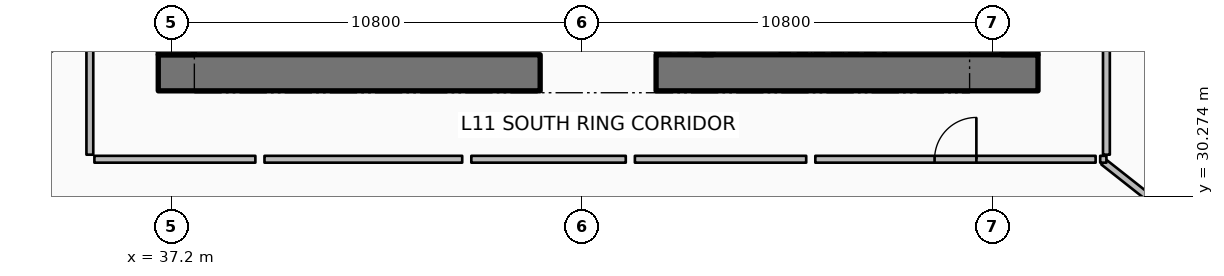
"""IFC4 building model, lengths in metres.
Left out: names, types, materials, properties, quantities, classifications, styles, units other than length and angle.
Written with IfcOpenShell. Run it as: python <this file> out.ifc"""

import sys

from ifc_helpers import new_model, si_unit, direction, frame, frame_2d, origin, place, context, subcontext, project, spatial, rectangle, extrude, element, fill, save


model = new_model("IFC4")
c1 = context("Model", 3, precision=1e-05, world=origin(), true_north=direction((0.0, 1.0)))
c2 = subcontext(c1, "Body", "Model", "MODEL_VIEW")
j1 = project(units=[si_unit("LENGTHUNIT", "METRE"), si_unit("PLANEANGLEUNIT", "RADIAN")], contexts=[c1])
p1 = place(None, origin())
s1 = spatial("IfcSite", under=j1, at=p1, CompositionType="ELEMENT")
p2 = place(p1, origin())
s2 = spatial("IfcBuilding", under=s1, at=p2, CompositionType="ELEMENT")
p3 = place(p2, frame((0.0, 0.0, 48.9)))
s3 = spatial("IfcBuildingStorey", under=s2, at=p3, CompositionType="ELEMENT", Elevation=48.9)
p4 = place(p3, frame((36.85, 33.525, 0.0), z_axis=(0.0, 0.0, 1.0), x_axis=(1.0, 0.0, 0.0)))
e1 = element("IfcWall", 1, at=p4, inside=s3, PredefinedType="SHEAR", context=c2, shape_type="SweptSolid", body=[
    extrude(rectangle(XDim=10.05, YDim=0.95, at=frame_2d((5.025, 0.0))), origin(), (0.0, 0.0, 1.0), 3.75),
])
p5 = place(p3, frame((49.95, 33.525, 0.0), z_axis=(0.0, 0.0, 1.0), x_axis=(1.0, 0.0, 0.0)))
e2 = element("IfcWall", 2, at=p5, inside=s3, PredefinedType="SHEAR", context=c2, shape_type="SweptSolid", body=[
    extrude(rectangle(XDim=10.05, YDim=0.95, at=frame_2d((5.025, 0.0))), origin(), (0.0, 0.0, 1.0), 3.75),
])
for number, where, z_axis, x_axis in (
    (3, (37.325, 34.0, 0.0), (0.0, 0.0, 1.0), (0.0, 1.0, 0.0)),
    (4, (59.525, 34.0, 0.0), (0.0, 0.0, 1.0), (0.0, 1.0, 0.0)),
):
    element("IfcWall", number, at=place(p3, frame(where, z_axis=z_axis, x_axis=x_axis)), inside=s3, PredefinedType="SHEAR", context=c2, shape_type="SweptSolid", body=[
        extrude(rectangle(XDim=16.0, YDim=0.95, at=frame_2d((8.0, 0.0))), origin(), (0.0, 0.0, 1.0), 3.75),
    ])
p6 = place(p3, frame((51.31, 34.0, 0.0), z_axis=(0.0, 0.0, 1.0), x_axis=(0.0, 1.0, 0.0)))
e5 = element("IfcWall", 5, at=p6, inside=s3, PredefinedType="SHEAR", context=c2, shape_type="SweptSolid", body=[
    extrude(rectangle(XDim=3.5, YDim=0.28, at=frame_2d((1.75, 0.0))), origin(), (0.0, 0.0, 1.0), 3.75),
])
p7 = place(p3, frame((34.954, 34.694, 0.0), z_axis=(0.0, 0.0, 1.0), x_axis=(-0.872493465611, -0.488625779577, 0.0)))
e6 = element("IfcWall", 6, at=p7, inside=s3, PredefinedType="PARTITIONING", context=c2, shape_type="SweptSolid", body=[
    extrude(rectangle(XDim=16.586, YDim=0.18, at=frame_2d((8.293, 0.0))), origin(), (0.0, 0.0, 1.0), 2.867),
])
p8 = place(p3, frame((61.723, 31.182, 0.0), z_axis=(0.0, 0.0, 1.0), x_axis=(0.785321288316, -0.619088421889, 0.0)))
e7 = element("IfcWall", 7, at=p8, inside=s3, PredefinedType="PARTITIONING", context=c2, shape_type="SweptSolid", body=[
    extrude(rectangle(XDim=10.598, YDim=0.18, at=frame_2d((5.299, 0.0))), origin(), (0.0, 0.0, 1.0), 2.867),
])
p9 = place(p3, frame((54.14, 31.25, 0.0), z_axis=(0.0, 0.0, 1.0), x_axis=(1.0, 0.0, 0.0)))
e8 = element("IfcWall", 8, at=p9, inside=s3, PredefinedType="PARTITIONING", context=c2, shape_type="SweptSolid", body=[
    extrude(rectangle(XDim=7.376, YDim=0.18, at=frame_2d((3.688, 0.0))), origin(), (0.0, 0.0, 1.0), 2.867),
])
p10 = place(p9, frame((3.138, 0.0, 0.0)))
e9 = element("IfcOpeningElement", 9, at=p10, cuts=e8, PredefinedType="OPENING", context=c2, shape_type="SweptSolid", body=[
    extrude(rectangle(XDim=1.1, YDim=2.1, at=frame_2d((0.55, 1.05))), frame((0.0, 0.1, 0.0), z_axis=(0.0, -1.0, 0.0), x_axis=(1.0, 0.0, 0.0)), (0.0, 0.0, 1.0), 0.2),
])
p11 = place(p3, frame((35.05, 34.628, 0.0), z_axis=(0.0, 0.0, 1.0), x_axis=(0.0, -1.0, 0.0)))
e10 = element("IfcWall", 10, at=p11, inside=s3, PredefinedType="PARTITIONING", context=c2, shape_type="SweptSolid", body=[
    extrude(rectangle(XDim=3.258, YDim=0.18, at=frame_2d((1.629, 0.0))), origin(), (0.0, 0.0, 1.0), 2.867),
])
p12 = place(p3, frame((35.17, 31.25, 0.0), z_axis=(0.0, 0.0, 1.0), x_axis=(1.0, 0.0, 0.0)))
e11 = element("IfcWall", 11, at=p12, inside=s3, PredefinedType="PARTITIONING", context=c2, shape_type="SweptSolid", body=[
    extrude(rectangle(XDim=4.236, YDim=0.18, at=frame_2d((2.118, 0.0))), origin(), (0.0, 0.0, 1.0), 2.867),
])
p13 = place(p3, frame((39.646, 31.25, 0.0), z_axis=(0.0, 0.0, 1.0), x_axis=(1.0, 0.0, 0.0)))
e12 = element("IfcWall", 12, at=p13, inside=s3, PredefinedType="PARTITIONING", context=c2, shape_type="SweptSolid", body=[
    extrude(rectangle(XDim=5.203, YDim=0.18, at=frame_2d((2.601, 0.0))), origin(), (0.0, 0.0, 1.0), 2.867),
])
p14 = place(p3, frame((45.088, 31.25, 0.0), z_axis=(0.0, 0.0, 1.0), x_axis=(1.0, 0.0, 0.0)))
e13 = element("IfcWall", 13, at=p14, inside=s3, PredefinedType="PARTITIONING", context=c2, shape_type="SweptSolid", body=[
    extrude(rectangle(XDim=4.064, YDim=0.18, at=frame_2d((2.032, 0.0))), origin(), (0.0, 0.0, 1.0), 2.867),
])
p15 = place(p3, frame((49.392, 31.25, 0.0), z_axis=(0.0, 0.0, 1.0), x_axis=(1.0, 0.0, 0.0)))
e14 = element("IfcWall", 14, at=p15, inside=s3, PredefinedType="PARTITIONING", context=c2, shape_type="SweptSolid", body=[
    extrude(rectangle(XDim=4.508, YDim=0.18, at=frame_2d((2.254, 0.0))), origin(), (0.0, 0.0, 1.0), 2.867),
])
p16 = place(p3, frame((61.636, 31.25, 0.0), z_axis=(0.0, 0.0, 1.0), x_axis=(1.0, 0.0, 0.0)))
e15 = element("IfcWall", 15, at=p16, inside=s3, PredefinedType="PARTITIONING", context=c2, shape_type="SweptSolid", body=[
    extrude(rectangle(XDim=0.164, YDim=0.18, at=frame_2d((0.082, 0.0))), origin(), (0.0, 0.0, 1.0), 2.867),
])
p17 = place(p3, frame((61.8, 31.37, 0.0), z_axis=(0.0, 0.0, 1.0), x_axis=(0.0, 1.0, 0.0)))
e16 = element("IfcWall", 16, at=p17, inside=s3, PredefinedType="PARTITIONING", context=c2, shape_type="SweptSolid", body=[
    extrude(rectangle(XDim=6.618, YDim=0.18, at=frame_2d((3.309, 0.0))), origin(), (0.0, 0.0, 1.0), 2.867),
])
p18 = place(p17, frame((2.759, 0.0, 0.0)))
e17 = element("IfcOpeningElement", 17, at=p18, cuts=e16, PredefinedType="OPENING", context=c2, shape_type="SweptSolid", body=[
    extrude(rectangle(XDim=1.1, YDim=2.1, at=frame_2d((0.55, 1.05))), frame((0.0, 0.1, 0.0), z_axis=(0.0, -1.0, 0.0), x_axis=(1.0, 0.0, 0.0)), (0.0, 0.0, 1.0), 0.2),
])
p19 = place(p10, origin())
e18 = element("IfcDoor", 18, at=p19, inside=s3, OperationType="SINGLE_SWING_RIGHT", PredefinedType="DOOR", context=c2, shape_type="SweptSolid", body=[
    extrude(rectangle(XDim=1.1, YDim=2.1, at=frame_2d((0.55, 1.05))), frame((0.0, 0.025, 0.0), z_axis=(0.0, -1.0, 0.0), x_axis=(1.0, 0.0, 0.0)), (0.0, 0.0, 1.0), 0.05),
])
fill(e9, e18)
save(model, sys.argv[1])
